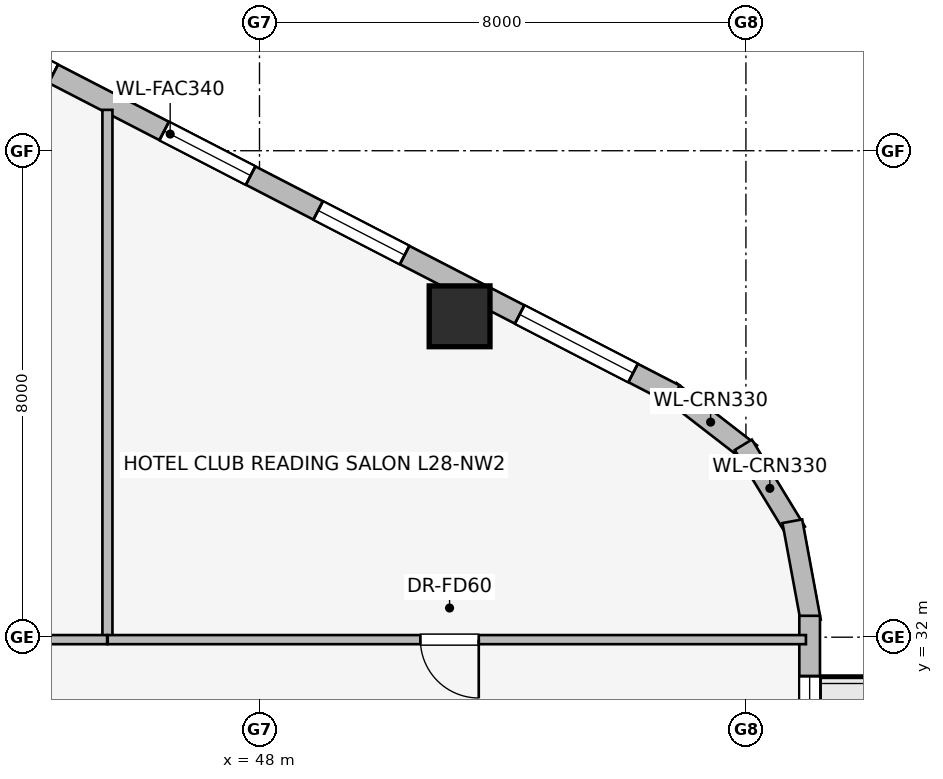
"""IFC4 building model, lengths in metres.
Left out: names, types, materials, properties, quantities, classifications, styles, units other than length and angle.
Written with IfcOpenShell. Run it as: python <this file> out.ifc"""

import sys

from ifc_helpers import new_model, si_unit, direction, frame, frame_2d, origin, origin_2d, place, context, subcontext, project, spatial, rectangle, extrude, element, fill, save


model = new_model("IFC4")
c1 = context("Model", 3, precision=1e-05, world=origin(), true_north=direction((0.0, 1.0)))
c2 = subcontext(c1, "Body", "Model", "MODEL_VIEW")
j1 = project(units=[si_unit("LENGTHUNIT", "METRE"), si_unit("PLANEANGLEUNIT", "RADIAN")], contexts=[c1])
p1 = place(None, origin())
s1 = spatial("IfcSite", under=j1, at=p1, CompositionType="ELEMENT")
p2 = place(p1, origin())
s2 = spatial("IfcBuilding", under=s1, at=p2, CompositionType="ELEMENT")
p3 = place(p2, frame((0.0, 0.0, 108.45)))
s3 = spatial("IfcBuildingStorey", under=s2, at=p3, CompositionType="ELEMENT", Elevation=108.45)
p4 = place(p3, frame((51.291, 37.277, 0.0), z_axis=(0.0, 0.0, 1.0), x_axis=(1.0, 0.0, 0.0)))
e1 = element("IfcColumn", 1, at=p4, inside=s3, PredefinedType="COLUMN", context=c2, shape_type="SweptSolid", body=[
    extrude(rectangle(XDim=1.0, YDim=1.0, at=origin_2d()), origin(), (0.0, 0.0, 1.0), 3.45),
])
p5 = place(p3, frame((54.757, 36.05, 0.0), z_axis=(0.0, 0.0, 1.0), x_axis=(0.790621329885, -0.612305408053, 0.0)))
e2 = element("IfcWall", 2, at=p5, inside=s3, PredefinedType="STANDARD", context=c2, shape_type="SweptSolid", body=[
    extrude(rectangle(XDim=1.676, YDim=0.33, at=frame_2d((0.838, 0.0))), origin(), (0.0, 0.0, 1.0), 3.16),
])
p6 = place(p3, frame((55.957, 35.164, 0.0), z_axis=(0.0, 0.0, 1.0), x_axis=(0.520519429557, -0.853849824883, 0.0)))
e3 = element("IfcWall", 3, at=p6, inside=s3, PredefinedType="STANDARD", context=c2, shape_type="SweptSolid", body=[
    extrude(rectangle(XDim=1.677, YDim=0.33, at=frame_2d((0.839, 0.0))), origin(), (0.0, 0.0, 1.0), 3.16),
])
p7 = place(p3, frame((56.763, 33.907, 0.0), z_axis=(0.0, 0.0, 1.0), x_axis=(0.181984991895, -0.983301308209, 0.0)))
e4 = element("IfcWall", 4, at=p7, inside=s3, PredefinedType="STANDARD", context=c2, shape_type="SweptSolid", body=[
    extrude(rectangle(XDim=1.677, YDim=0.33, at=frame_2d((0.838, 0.0))), origin(), (0.0, 0.0, 1.0), 3.16),
])
p8 = place(p3, frame((38.231, 44.558, 0.0), z_axis=(0.0, 0.0, 1.0), x_axis=(0.888613612362, -0.458656568606, 0.0)))
e5 = element("IfcWall", 5, at=p8, inside=s3, PredefinedType="STANDARD", context=c2, shape_type="SweptSolid", body=[
    extrude(rectangle(XDim=18.681, YDim=0.34, at=frame_2d((9.34, 0.0))), origin(), (0.0, 0.0, 1.0), 3.16),
])
p9 = place(p8, frame((1.023, 0.0, 0.75)))
e6 = element("IfcOpeningElement", 6, at=p9, cuts=e5, PredefinedType="OPENING", context=c2, shape_type="SweptSolid", body=[
    extrude(rectangle(XDim=1.6, YDim=1.55, at=frame_2d((0.8, 0.775))), frame((0.0, 0.18, 0.0), z_axis=(0.0, -1.0, 0.0), x_axis=(1.0, 0.0, 0.0)), (0.0, 0.0, 1.0), 0.36),
])
p10 = place(p8, frame((5.077, 0.0, 0.75)))
e7 = element("IfcOpeningElement", 7, at=p10, cuts=e5, PredefinedType="OPENING", context=c2, shape_type="SweptSolid", body=[
    extrude(rectangle(XDim=2.1, YDim=1.5, at=frame_2d((1.05, 0.75))), frame((0.0, 0.18, 0.0), z_axis=(0.0, -1.0, 0.0), x_axis=(1.0, 0.0, 0.0)), (0.0, 0.0, 1.0), 0.36),
])
p11 = place(p8, frame((9.229, 0.0, 0.75)))
e8 = element("IfcOpeningElement", 8, at=p11, cuts=e5, PredefinedType="OPENING", context=c2, shape_type="SweptSolid", body=[
    extrude(rectangle(XDim=1.6, YDim=1.55, at=frame_2d((0.8, 0.775))), frame((0.0, 0.18, 0.0), z_axis=(0.0, -1.0, 0.0), x_axis=(1.0, 0.0, 0.0)), (0.0, 0.0, 1.0), 0.36),
])
p12 = place(p8, frame((12.079, 0.0, 0.75)))
e9 = element("IfcOpeningElement", 9, at=p12, cuts=e5, PredefinedType="OPENING", context=c2, shape_type="SweptSolid", body=[
    extrude(rectangle(XDim=1.6, YDim=1.55, at=frame_2d((0.8, 0.775))), frame((0.0, 0.18, 0.0), z_axis=(0.0, -1.0, 0.0), x_axis=(1.0, 0.0, 0.0)), (0.0, 0.0, 1.0), 0.36),
])
p13 = place(p8, frame((15.808, 0.0, 0.75)))
e10 = element("IfcOpeningElement", 10, at=p13, cuts=e5, PredefinedType="OPENING", context=c2, shape_type="SweptSolid", body=[
    extrude(rectangle(XDim=2.1, YDim=1.5, at=frame_2d((1.05, 0.75))), frame((0.0, 0.18, 0.0), z_axis=(0.0, -1.0, 0.0), x_axis=(1.0, 0.0, 0.0)), (0.0, 0.0, 1.0), 0.36),
])
p14 = place(p3, frame((57.048, 32.352, 0.0), z_axis=(0.0, 0.0, 1.0), x_axis=(0.0, -1.0, 0.0)))
e11 = element("IfcWall", 11, at=p14, inside=s3, PredefinedType="STANDARD", context=c2, shape_type="SweptSolid", body=[
    extrude(rectangle(XDim=7.684, YDim=0.34, at=frame_2d((3.842, 0.0))), origin(), (0.0, 0.0, 1.0), 3.16),
])
p15 = place(p14, frame((4.036, 0.0, 0.0)))
e12 = element("IfcOpeningElement", 12, at=p15, cuts=e11, PredefinedType="OPENING", context=c2, shape_type="SweptSolid", body=[
    extrude(rectangle(XDim=1.1, YDim=2.04, at=frame_2d((0.55, 1.02))), frame((0.0, 0.18, 0.0), z_axis=(0.0, -1.0, 0.0), x_axis=(1.0, 0.0, 0.0)), (0.0, 0.0, 1.0), 0.36),
])
p16 = place(p14, frame((0.992, 0.0, 0.75)))
e13 = element("IfcOpeningElement", 13, at=p16, cuts=e11, PredefinedType="OPENING", context=c2, shape_type="SweptSolid", body=[
    extrude(rectangle(XDim=1.05, YDim=1.4, at=frame_2d((0.525, 0.7))), frame((0.0, 0.18, 0.0), z_axis=(0.0, -1.0, 0.0), x_axis=(1.0, 0.0, 0.0)), (0.0, 0.0, 1.0), 0.36),
])
p17 = place(p14, frame((5.77, 0.0, 0.75)))
e14 = element("IfcOpeningElement", 14, at=p17, cuts=e11, PredefinedType="OPENING", context=c2, shape_type="SweptSolid", body=[
    extrude(rectangle(XDim=1.05, YDim=1.4, at=frame_2d((0.525, 0.7))), frame((0.0, 0.18, 0.0), z_axis=(0.0, -1.0, 0.0), x_axis=(1.0, 0.0, 0.0)), (0.0, 0.0, 1.0), 0.36),
])
p18 = place(p3, frame((45.499, 31.97, 0.0), z_axis=(0.0, 0.0, 1.0), x_axis=(0.0, 1.0, 0.0)))
e15 = element("IfcWall", 15, at=p18, inside=s3, PredefinedType="PARTITIONING", context=c2, shape_type="SweptSolid", body=[
    extrude(rectangle(XDim=8.702, YDim=0.165, at=frame_2d((4.351, 0.0))), origin(), (0.0, 0.0, 1.0), 3.16),
])
p19 = place(p3, frame((45.494, 31.96, 0.0), z_axis=(0.0, 0.0, 1.0), x_axis=(-1.0, 0.0, 0.0)))
e16 = element("IfcWall", 16, at=p19, inside=s3, PredefinedType="PARTITIONING", context=c2, shape_type="SweptSolid", body=[
    extrude(rectangle(XDim=11.204, YDim=0.15, at=frame_2d((5.602, 0.0))), origin(), (0.0, 0.0, 1.0), 3.16),
])
p20 = place(p19, frame((3.903, 0.0, 0.0)))
e17 = element("IfcOpeningElement", 17, at=p20, cuts=e16, PredefinedType="OPENING", context=c2, shape_type="SweptSolid", body=[
    extrude(rectangle(XDim=0.96, YDim=2.0, at=frame_2d((0.48, 1.0))), frame((0.0, 0.085, 0.0), z_axis=(0.0, -1.0, 0.0), x_axis=(1.0, 0.0, 0.0)), (0.0, 0.0, 1.0), 0.17),
])
p21 = place(p3, frame((56.987, 31.96, 0.0), z_axis=(0.0, 0.0, 1.0), x_axis=(-1.0, 0.0, 0.0)))
e18 = element("IfcWall", 18, at=p21, inside=s3, PredefinedType="PARTITIONING", context=c2, shape_type="SweptSolid", body=[
    extrude(rectangle(XDim=11.483, YDim=0.15, at=frame_2d((5.742, 0.0))), origin(), (0.0, 0.0, 1.0), 3.16),
])
p22 = place(p21, frame((5.381, 0.0, 0.0)))
e19 = element("IfcOpeningElement", 19, at=p22, cuts=e18, PredefinedType="OPENING", context=c2, shape_type="SweptSolid", body=[
    extrude(rectangle(XDim=0.96, YDim=2.0, at=frame_2d((0.48, 1.0))), frame((0.0, 0.085, 0.0), z_axis=(0.0, -1.0, 0.0), x_axis=(1.0, 0.0, 0.0)), (0.0, 0.0, 1.0), 0.17),
])
p23 = place(p10, origin())
e20 = element("IfcWindow", 20, at=p23, inside=s3, PartitioningType="SINGLE_PANEL", PredefinedType="WINDOW", context=c2, shape_type="SweptSolid", body=[
    extrude(rectangle(XDim=2.1, YDim=1.5, at=frame_2d((1.05, 0.75))), frame((0.0, 0.03, 0.0), z_axis=(0.0, -1.0, 0.0), x_axis=(1.0, 0.0, 0.0)), (0.0, 0.0, 1.0), 0.06),
])
fill(e7, e20)
p24 = place(p11, origin())
e21 = element("IfcWindow", 21, at=p24, inside=s3, PartitioningType="SINGLE_PANEL", PredefinedType="WINDOW", context=c2, shape_type="SweptSolid", body=[
    extrude(rectangle(XDim=1.6, YDim=1.55, at=frame_2d((0.8, 0.775))), frame((0.0, 0.03, 0.0), z_axis=(0.0, -1.0, 0.0), x_axis=(1.0, 0.0, 0.0)), (0.0, 0.0, 1.0), 0.06),
])
fill(e8, e21)
p25 = place(p12, origin())
e22 = element("IfcWindow", 22, at=p25, inside=s3, PartitioningType="SINGLE_PANEL", PredefinedType="WINDOW", context=c2, shape_type="SweptSolid", body=[
    extrude(rectangle(XDim=1.6, YDim=1.55, at=frame_2d((0.8, 0.775))), frame((0.0, 0.03, 0.0), z_axis=(0.0, -1.0, 0.0), x_axis=(1.0, 0.0, 0.0)), (0.0, 0.0, 1.0), 0.06),
])
fill(e9, e22)
p26 = place(p13, origin())
e23 = element("IfcWindow", 23, at=p26, inside=s3, PartitioningType="SINGLE_PANEL", PredefinedType="WINDOW", context=c2, shape_type="SweptSolid", body=[
    extrude(rectangle(XDim=2.1, YDim=1.5, at=frame_2d((1.05, 0.75))), frame((0.0, 0.03, 0.0), z_axis=(0.0, -1.0, 0.0), x_axis=(1.0, 0.0, 0.0)), (0.0, 0.0, 1.0), 0.06),
])
fill(e10, e23)
p27 = place(p16, origin())
e24 = element("IfcWindow", 24, at=p27, inside=s3, PartitioningType="SINGLE_PANEL", PredefinedType="WINDOW", context=c2, shape_type="SweptSolid", body=[
    extrude(rectangle(XDim=1.05, YDim=1.4, at=frame_2d((0.525, 0.7))), frame((0.0, 0.03, 0.0), z_axis=(0.0, -1.0, 0.0), x_axis=(1.0, 0.0, 0.0)), (0.0, 0.0, 1.0), 0.06),
])
fill(e13, e24)
p28 = place(p22, origin())
e25 = element("IfcDoor", 25, at=p28, inside=s3, OperationType="SINGLE_SWING_LEFT", PredefinedType="DOOR", context=c2, shape_type="SweptSolid", body=[
    extrude(rectangle(XDim=0.96, YDim=2.0, at=frame_2d((0.48, 1.0))), frame((0.0, 0.025, 0.0), z_axis=(0.0, -1.0, 0.0), x_axis=(1.0, 0.0, 0.0)), (0.0, 0.0, 1.0), 0.05),
])
fill(e19, e25)
save(model, sys.argv[1])
